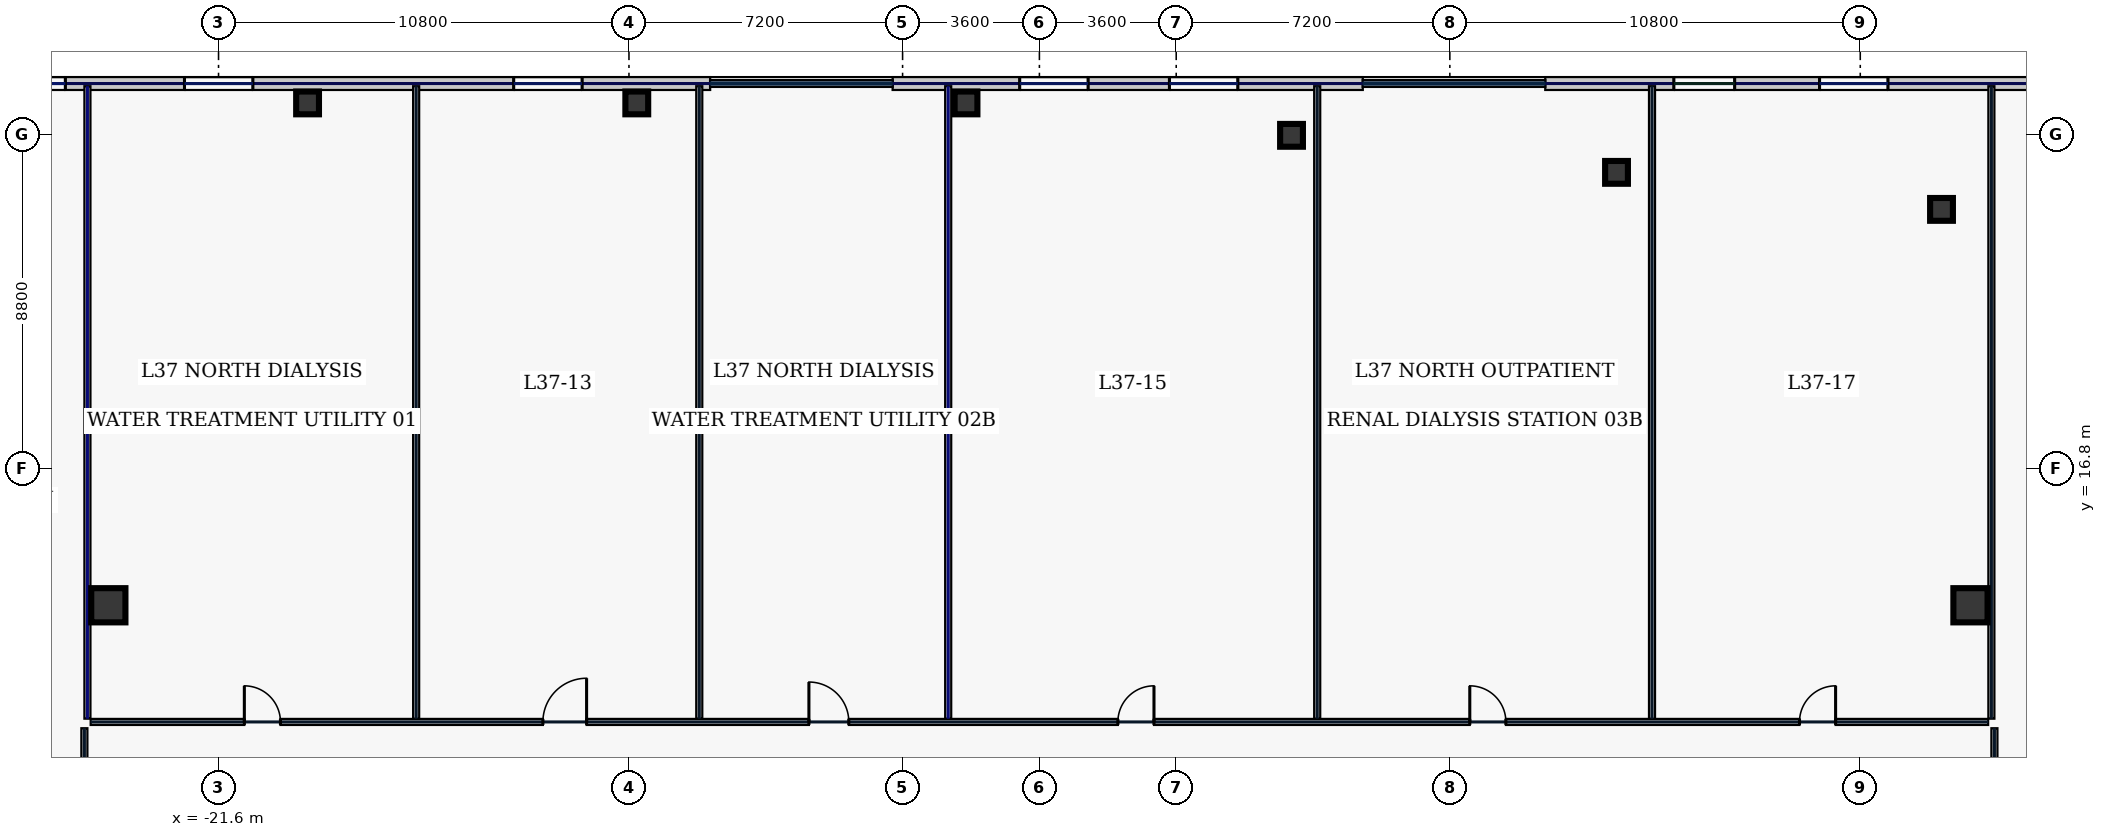
"""IFC4 building model, lengths in metres.
Left out: names, types, materials, properties, quantities, classifications, styles, units other than length and angle.
Written with IfcOpenShell. Run it as: python <this file> out.ifc"""

import sys

from ifc_helpers import new_model, si_unit, direction, frame, frame_2d, origin, origin_2d, place, context, subcontext, project, spatial, rectangle, hollow_rectangle, extrude, element, fill, save


model = new_model("IFC4")
c1 = context("Model", 3, precision=1e-05, world=origin(), true_north=direction((0.0, 1.0)))
c2 = subcontext(c1, "Body", "Model", "MODEL_VIEW")
j1 = project(units=[si_unit("LENGTHUNIT", "METRE"), si_unit("PLANEANGLEUNIT", "RADIAN")], contexts=[c1])
p1 = place(None, origin())
s1 = spatial("IfcSite", under=j1, at=p1, CompositionType="ELEMENT")
p2 = place(p1, origin())
s2 = spatial("IfcBuilding", under=s1, at=p2, CompositionType="ELEMENT")
p3 = place(p2, frame((0.0, 0.0, 164.2)))
s3 = spatial("IfcBuildingStorey", under=s2, at=p3, CompositionType="ELEMENT", Elevation=164.2)
for number, where, z_axis, x_axis in (
    (1, (-24.5, 13.2, 0.0), (0.0, 0.0, 1.0), (1.0, 0.0, 0.0)),
    (2, (24.5, 13.2, 0.0), (0.0, 0.0, 1.0), (1.0, 0.0, 0.0)),
):
    element("IfcColumn", number, at=place(p3, frame(where, z_axis=z_axis, x_axis=x_axis)), inside=s3, PredefinedType="COLUMN", context=c2, shape_type="SweptSolid", body=[
        extrude(hollow_rectangle(XDim=0.9, YDim=0.9, WallThickness=0.04, at=origin_2d()), origin(), (0.0, 0.0, 1.0), 3.74),
    ])
for number, where, z_axis, x_axis in (
    (3, (23.738, 23.618, 0.0), (0.0, 0.0, 1.0), (1.0, 0.0, 0.0)),
    (4, (15.186, 24.592, 0.0), (0.0, 0.0, 1.0), (1.0, 0.0, 0.0)),
    (5, (6.634, 25.567, 0.0), (0.0, 0.0, 1.0), (1.0, 0.0, 0.0)),
    (6, (-1.931, 26.42, 0.0), (0.0, 0.0, 1.0), (1.0, 0.0, 0.0)),
    (7, (-10.594, 26.42, 0.0), (0.0, 0.0, 1.0), (1.0, 0.0, 0.0)),
    (8, (-19.257, 26.42, 0.0), (0.0, 0.0, 1.0), (1.0, 0.0, 0.0)),
):
    element("IfcColumn", number, at=place(p3, frame(where, z_axis=z_axis, x_axis=x_axis)), inside=s3, PredefinedType="COLUMN", context=c2, shape_type="SweptSolid", body=[
        extrude(hollow_rectangle(XDim=0.6, YDim=0.6, WallThickness=0.028, at=origin_2d()), origin(), (0.0, 0.0, 1.0), 3.74),
    ])
p4 = place(p3, frame((33.4, 26.93, 0.0), z_axis=(0.0, 0.0, 1.0), x_axis=(-1.0, 0.0, 0.0)))
e9 = element("IfcWall", 9, at=p4, inside=s3, PredefinedType="STANDARD", context=c2, shape_type="SweptSolid", body=[
    extrude(rectangle(XDim=20.09, YDim=0.34, at=frame_2d((10.045, 0.0))), origin(), (0.0, 0.0, 1.0), 3.74),
])
p5 = place(p4, frame((15.105, 0.0, 0.22)))
e10 = element("IfcOpeningElement", 10, at=p5, cuts=e9, PredefinedType="OPENING", context=c2, shape_type="SweptSolid", body=[
    extrude(rectangle(XDim=1.6, YDim=1.2, at=frame_2d((0.8, 0.6))), frame((0.0, 0.18, 0.0), z_axis=(0.0, -1.0, 0.0), x_axis=(1.0, 0.0, 0.0)), (0.0, 0.0, 1.0), 0.36),
])
p6 = place(p4, frame((11.071, 0.0, 0.7)))
e11 = element("IfcOpeningElement", 11, at=p6, cuts=e9, PredefinedType="OPENING", context=c2, shape_type="SweptSolid", body=[
    extrude(rectangle(XDim=1.8, YDim=2.2, at=frame_2d((0.9, 1.1))), frame((0.0, 0.18, 0.0), z_axis=(0.0, -1.0, 0.0), x_axis=(1.0, 0.0, 0.0)), (0.0, 0.0, 1.0), 0.36),
])
p7 = place(p4, frame((6.48, 0.0, 0.7)))
e12 = element("IfcOpeningElement", 12, at=p7, cuts=e9, PredefinedType="OPENING", context=c2, shape_type="SweptSolid", body=[
    extrude(rectangle(XDim=0.85, YDim=1.85, at=frame_2d((0.425, 0.925))), frame((0.0, 0.18, 0.0), z_axis=(0.0, -1.0, 0.0), x_axis=(1.0, 0.0, 0.0)), (0.0, 0.0, 1.0), 0.36),
])
p8 = place(p4, frame((2.591, 0.0, 0.7)))
e13 = element("IfcOpeningElement", 13, at=p8, cuts=e9, PredefinedType="OPENING", context=c2, shape_type="SweptSolid", body=[
    extrude(rectangle(XDim=1.8, YDim=2.2, at=frame_2d((0.9, 1.1))), frame((0.0, 0.18, 0.0), z_axis=(0.0, -1.0, 0.0), x_axis=(1.0, 0.0, 0.0)), (0.0, 0.0, 1.0), 0.36),
])
p9 = place(p3, frame((8.51, 26.93, 0.0), z_axis=(0.0, 0.0, 1.0), x_axis=(-1.0, 0.0, 0.0)))
e14 = element("IfcWall", 14, at=p9, inside=s3, PredefinedType="STANDARD", context=c2, shape_type="SweptSolid", body=[
    extrude(rectangle(XDim=12.373, YDim=0.34, at=frame_2d((6.187, 0.0))), origin(), (0.0, 0.0, 1.0), 3.74),
])
p10 = place(p9, frame((7.229, 0.0, 0.7)))
e15 = element("IfcOpeningElement", 15, at=p10, cuts=e14, PredefinedType="OPENING", context=c2, shape_type="SweptSolid", body=[
    extrude(rectangle(XDim=1.8, YDim=2.2, at=frame_2d((0.9, 1.1))), frame((0.0, 0.18, 0.0), z_axis=(0.0, -1.0, 0.0), x_axis=(1.0, 0.0, 0.0)), (0.0, 0.0, 1.0), 0.36),
])
p11 = place(p9, frame((3.289, 0.0, 0.7)))
e16 = element("IfcOpeningElement", 16, at=p11, cuts=e14, PredefinedType="OPENING", context=c2, shape_type="SweptSolid", body=[
    extrude(rectangle(XDim=1.8, YDim=2.2, at=frame_2d((0.9, 1.1))), frame((0.0, 0.18, 0.0), z_axis=(0.0, -1.0, 0.0), x_axis=(1.0, 0.0, 0.0)), (0.0, 0.0, 1.0), 0.36),
])
p12 = place(p3, frame((-8.663, 26.93, 0.0), z_axis=(0.0, 0.0, 1.0), x_axis=(-1.0, 0.0, 0.0)))
e17 = element("IfcWall", 17, at=p12, inside=s3, PredefinedType="STANDARD", context=c2, shape_type="SweptSolid", body=[
    extrude(rectangle(XDim=19.937, YDim=0.34, at=frame_2d((9.969, 0.0))), origin(), (0.0, 0.0, 1.0), 3.74),
])
p13 = place(p12, frame((16.968, 0.0, 0.7)))
e18 = element("IfcOpeningElement", 18, at=p13, cuts=e17, PredefinedType="OPENING", context=c2, shape_type="SweptSolid", body=[
    extrude(rectangle(XDim=0.85, YDim=1.85, at=frame_2d((0.425, 0.925))), frame((0.0, 0.18, 0.0), z_axis=(0.0, -1.0, 0.0), x_axis=(1.0, 0.0, 0.0)), (0.0, 0.0, 1.0), 0.36),
])
p14 = place(p12, frame((12.033, 0.0, 0.7)))
e19 = element("IfcOpeningElement", 19, at=p14, cuts=e17, PredefinedType="OPENING", context=c2, shape_type="SweptSolid", body=[
    extrude(rectangle(XDim=1.8, YDim=2.2, at=frame_2d((0.9, 1.1))), frame((0.0, 0.18, 0.0), z_axis=(0.0, -1.0, 0.0), x_axis=(1.0, 0.0, 0.0)), (0.0, 0.0, 1.0), 0.36),
])
p15 = place(p12, frame((3.371, 0.0, 0.7)))
e20 = element("IfcOpeningElement", 20, at=p15, cuts=e17, PredefinedType="OPENING", context=c2, shape_type="SweptSolid", body=[
    extrude(rectangle(XDim=1.8, YDim=2.2, at=frame_2d((0.9, 1.1))), frame((0.0, 0.18, 0.0), z_axis=(0.0, -1.0, 0.0), x_axis=(1.0, 0.0, 0.0)), (0.0, 0.0, 1.0), 0.36),
])
p16 = place(p3, frame((-25.13, 6.985, 0.0), z_axis=(0.0, 0.0, 1.0), x_axis=(0.0, 1.0, 0.0)))
e21 = element("IfcWall", 21, at=p16, inside=s3, PredefinedType="PARTITIONING", context=c2, shape_type="SweptSolid", body=[
    extrude(rectangle(XDim=2.98, YDim=0.16, at=frame_2d((1.49, 0.0))), origin(), (0.0, 0.0, 1.0), 3.74),
])
p17 = place(p16, frame((1.1, 0.0, 0.0)))
e22 = element("IfcOpeningElement", 22, at=p17, cuts=e21, PredefinedType="OPENING", context=c2, shape_type="SweptSolid", body=[
    extrude(rectangle(XDim=0.95, YDim=2.2, at=frame_2d((0.475, 1.1))), frame((0.0, 0.09, 0.0), z_axis=(0.0, -1.0, 0.0), x_axis=(1.0, 0.0, 0.0)), (0.0, 0.0, 1.0), 0.18),
])
p18 = place(p3, frame((-24.965, 10.13, 0.0), z_axis=(0.0, 0.0, 1.0), x_axis=(1.0, 0.0, 0.0)))
e23 = element("IfcWall", 23, at=p18, inside=s3, PredefinedType="PARTITIONING", context=c2, shape_type="SweptSolid", body=[
    extrude(rectangle(XDim=49.93, YDim=0.16, at=frame_2d((24.965, 0.0))), origin(), (0.0, 0.0, 1.0), 3.74),
])
p19 = place(p18, frame((4.044, 0.0, 0.0)))
e24 = element("IfcOpeningElement", 24, at=p19, cuts=e23, PredefinedType="OPENING", context=c2, shape_type="SweptSolid", body=[
    extrude(rectangle(XDim=0.95, YDim=2.2, at=frame_2d((0.475, 1.1))), frame((0.0, 0.09, 0.0), z_axis=(0.0, -1.0, 0.0), x_axis=(1.0, 0.0, 0.0)), (0.0, 0.0, 1.0), 0.18),
])
p20 = place(p18, frame((11.9, 0.0, 0.0)))
e25 = element("IfcOpeningElement", 25, at=p20, cuts=e23, PredefinedType="OPENING", context=c2, shape_type="SweptSolid", body=[
    extrude(rectangle(XDim=1.15, YDim=2.2, at=frame_2d((0.575, 1.1))), frame((0.0, 0.09, 0.0), z_axis=(0.0, -1.0, 0.0), x_axis=(1.0, 0.0, 0.0)), (0.0, 0.0, 1.0), 0.18),
])
p21 = place(p18, frame((18.9, 0.0, 0.0)))
e26 = element("IfcOpeningElement", 26, at=p21, cuts=e23, PredefinedType="OPENING", context=c2, shape_type="SweptSolid", body=[
    extrude(rectangle(XDim=1.05, YDim=2.2, at=frame_2d((0.525, 1.1))), frame((0.0, 0.09, 0.0), z_axis=(0.0, -1.0, 0.0), x_axis=(1.0, 0.0, 0.0)), (0.0, 0.0, 1.0), 0.18),
])
p22 = place(p18, frame((27.03, 0.0, 0.0)))
e27 = element("IfcOpeningElement", 27, at=p22, cuts=e23, PredefinedType="OPENING", context=c2, shape_type="SweptSolid", body=[
    extrude(rectangle(XDim=0.95, YDim=2.2, at=frame_2d((0.475, 1.1))), frame((0.0, 0.09, 0.0), z_axis=(0.0, -1.0, 0.0), x_axis=(1.0, 0.0, 0.0)), (0.0, 0.0, 1.0), 0.18),
])
p23 = place(p18, frame((36.29, 0.0, 0.0)))
e28 = element("IfcOpeningElement", 28, at=p23, cuts=e23, PredefinedType="OPENING", context=c2, shape_type="SweptSolid", body=[
    extrude(rectangle(XDim=0.95, YDim=2.2, at=frame_2d((0.475, 1.1))), frame((0.0, 0.09, 0.0), z_axis=(0.0, -1.0, 0.0), x_axis=(1.0, 0.0, 0.0)), (0.0, 0.0, 1.0), 0.18),
])
p24 = place(p18, frame((44.966, 0.0, 0.0)))
e29 = element("IfcOpeningElement", 29, at=p24, cuts=e23, PredefinedType="OPENING", context=c2, shape_type="SweptSolid", body=[
    extrude(rectangle(XDim=0.95, YDim=2.2, at=frame_2d((0.475, 1.1))), frame((0.0, 0.09, 0.0), z_axis=(0.0, -1.0, 0.0), x_axis=(1.0, 0.0, 0.0)), (0.0, 0.0, 1.0), 0.18),
])
p25 = place(p3, frame((25.13, 9.965, 0.0), z_axis=(0.0, 0.0, 1.0), x_axis=(0.0, -1.0, 0.0)))
e30 = element("IfcWall", 30, at=p25, inside=s3, PredefinedType="PARTITIONING", context=c2, shape_type="SweptSolid", body=[
    extrude(rectangle(XDim=2.98, YDim=0.16, at=frame_2d((1.49, 0.0))), origin(), (0.0, 0.0, 1.0), 3.74),
])
p26 = place(p25, frame((1.1, 0.0, 0.0)))
e31 = element("IfcOpeningElement", 31, at=p26, cuts=e30, PredefinedType="OPENING", context=c2, shape_type="SweptSolid", body=[
    extrude(rectangle(XDim=0.95, YDim=2.2, at=frame_2d((0.475, 1.1))), frame((0.0, 0.09, 0.0), z_axis=(0.0, -1.0, 0.0), x_axis=(1.0, 0.0, 0.0)), (0.0, 0.0, 1.0), 0.18),
])
p27 = place(p3, frame((-25.05, 10.215, 0.0), z_axis=(0.0, 0.0, 1.0), x_axis=(0.0, 1.0, 0.0)))
e32 = element("IfcWall", 32, at=p27, inside=s3, PredefinedType="PARTITIONING", context=c2, shape_type="SweptSolid", body=[
    extrude(rectangle(XDim=16.645, YDim=0.16, at=frame_2d((8.323, 0.0))), origin(), (0.0, 0.0, 1.0), 3.285),
])
for number, where, z_axis, x_axis in (
    (33, (25.05, 10.215, 0.0), (0.0, 0.0, 1.0), (0.0, 1.0, 0.0)),
    (34, (-16.4, 10.215, 0.0), (0.0, 0.0, 1.0), (0.0, 1.0, 0.0)),
):
    element("IfcWall", number, at=place(p3, frame(where, z_axis=z_axis, x_axis=x_axis)), inside=s3, PredefinedType="PARTITIONING", context=c2, shape_type="SweptSolid", body=[
        extrude(rectangle(XDim=16.645, YDim=0.16, at=frame_2d((8.323, 0.0))), origin(), (0.0, 0.0, 1.0), 3.74),
    ])
p28 = place(p3, frame((-2.4, 10.215, 0.0), z_axis=(0.0, 0.0, 1.0), x_axis=(0.0, 1.0, 0.0)))
e35 = element("IfcWall", 35, at=p28, inside=s3, PredefinedType="PARTITIONING", context=c2, shape_type="SweptSolid", body=[
    extrude(rectangle(XDim=16.645, YDim=0.16, at=frame_2d((8.323, 0.0))), origin(), (0.0, 0.0, 1.0), 3.285),
])
for number, where, z_axis, x_axis in (
    (36, (16.12, 10.215, 0.0), (0.0, 0.0, 1.0), (0.0, 1.0, 0.0)),
    (37, (-8.95, 10.215, 0.0), (0.0, 0.0, 1.0), (0.0, 1.0, 0.0)),
    (38, (7.31, 10.215, 0.0), (0.0, 0.0, 1.0), (0.0, 1.0, 0.0)),
):
    element("IfcWall", number, at=place(p3, frame(where, z_axis=z_axis, x_axis=x_axis)), inside=s3, PredefinedType="PARTITIONING", context=c2, shape_type="SweptSolid", body=[
        extrude(rectangle(XDim=16.645, YDim=0.16, at=frame_2d((8.323, 0.0))), origin(), (0.0, 0.0, 1.0), 3.74),
    ])
p29 = place(p5, origin())
e39 = element("IfcWindow", 39, at=p29, inside=s3, PartitioningType="SINGLE_PANEL", PredefinedType="WINDOW", context=c2, shape_type="SweptSolid", body=[
    extrude(rectangle(XDim=1.6, YDim=1.2, at=frame_2d((0.8, 0.6))), frame((0.0, 0.03, 0.0), z_axis=(0.0, -1.0, 0.0), x_axis=(1.0, 0.0, 0.0)), (0.0, 0.0, 1.0), 0.06),
])
fill(e10, e39)
p30 = place(p6, origin())
e40 = element("IfcWindow", 40, at=p30, inside=s3, PartitioningType="SINGLE_PANEL", PredefinedType="WINDOW", context=c2, shape_type="SweptSolid", body=[
    extrude(rectangle(XDim=1.8, YDim=2.2, at=frame_2d((0.9, 1.1))), frame((0.0, 0.03, 0.0), z_axis=(0.0, -1.0, 0.0), x_axis=(1.0, 0.0, 0.0)), (0.0, 0.0, 1.0), 0.06),
])
fill(e11, e40)
p31 = place(p10, origin())
e41 = element("IfcWindow", 41, at=p31, inside=s3, PartitioningType="SINGLE_PANEL", PredefinedType="WINDOW", context=c2, shape_type="SweptSolid", body=[
    extrude(rectangle(XDim=1.8, YDim=2.2, at=frame_2d((0.9, 1.1))), frame((0.0, 0.03, 0.0), z_axis=(0.0, -1.0, 0.0), x_axis=(1.0, 0.0, 0.0)), (0.0, 0.0, 1.0), 0.06),
])
fill(e15, e41)
p32 = place(p11, origin())
e42 = element("IfcWindow", 42, at=p32, inside=s3, PartitioningType="SINGLE_PANEL", PredefinedType="WINDOW", context=c2, shape_type="SweptSolid", body=[
    extrude(rectangle(XDim=1.8, YDim=2.2, at=frame_2d((0.9, 1.1))), frame((0.0, 0.03, 0.0), z_axis=(0.0, -1.0, 0.0), x_axis=(1.0, 0.0, 0.0)), (0.0, 0.0, 1.0), 0.06),
])
fill(e16, e42)
p33 = place(p13, origin())
e43 = element("IfcWindow", 43, at=p33, inside=s3, PartitioningType="SINGLE_PANEL", PredefinedType="WINDOW", context=c2, shape_type="SweptSolid", body=[
    extrude(rectangle(XDim=0.85, YDim=1.85, at=frame_2d((0.425, 0.925))), frame((0.0, 0.03, 0.0), z_axis=(0.0, -1.0, 0.0), x_axis=(1.0, 0.0, 0.0)), (0.0, 0.0, 1.0), 0.06),
])
fill(e18, e43)
p34 = place(p14, origin())
e44 = element("IfcWindow", 44, at=p34, inside=s3, PartitioningType="SINGLE_PANEL", PredefinedType="WINDOW", context=c2, shape_type="SweptSolid", body=[
    extrude(rectangle(XDim=1.8, YDim=2.2, at=frame_2d((0.9, 1.1))), frame((0.0, 0.03, 0.0), z_axis=(0.0, -1.0, 0.0), x_axis=(1.0, 0.0, 0.0)), (0.0, 0.0, 1.0), 0.06),
])
fill(e19, e44)
p35 = place(p15, origin())
e45 = element("IfcWindow", 45, at=p35, inside=s3, PartitioningType="SINGLE_PANEL", PredefinedType="WINDOW", context=c2, shape_type="SweptSolid", body=[
    extrude(rectangle(XDim=1.8, YDim=2.2, at=frame_2d((0.9, 1.1))), frame((0.0, 0.03, 0.0), z_axis=(0.0, -1.0, 0.0), x_axis=(1.0, 0.0, 0.0)), (0.0, 0.0, 1.0), 0.06),
])
fill(e20, e45)
p36 = place(p19, origin())
e46 = element("IfcDoor", 46, at=p36, inside=s3, OperationType="SINGLE_SWING_LEFT", PredefinedType="DOOR", context=c2, shape_type="SweptSolid", body=[
    extrude(rectangle(XDim=0.95, YDim=2.2, at=frame_2d((0.475, 1.1))), frame((0.0, 0.025, 0.0), z_axis=(0.0, -1.0, 0.0), x_axis=(1.0, 0.0, 0.0)), (0.0, 0.0, 1.0), 0.05),
])
fill(e24, e46)
p37 = place(p20, origin())
e47 = element("IfcDoor", 47, at=p37, inside=s3, OperationType="SINGLE_SWING_RIGHT", PredefinedType="DOOR", context=c2, shape_type="SweptSolid", body=[
    extrude(rectangle(XDim=1.15, YDim=2.2, at=frame_2d((0.575, 1.1))), frame((0.0, 0.025, 0.0), z_axis=(0.0, -1.0, 0.0), x_axis=(1.0, 0.0, 0.0)), (0.0, 0.0, 1.0), 0.05),
])
fill(e25, e47)
p38 = place(p21, origin())
e48 = element("IfcDoor", 48, at=p38, inside=s3, OperationType="SINGLE_SWING_LEFT", PredefinedType="DOOR", context=c2, shape_type="SweptSolid", body=[
    extrude(rectangle(XDim=1.05, YDim=2.2, at=frame_2d((0.525, 1.1))), frame((0.0, 0.025, 0.0), z_axis=(0.0, -1.0, 0.0), x_axis=(1.0, 0.0, 0.0)), (0.0, 0.0, 1.0), 0.05),
])
fill(e26, e48)
p39 = place(p22, origin())
e49 = element("IfcDoor", 49, at=p39, inside=s3, OperationType="SINGLE_SWING_RIGHT", PredefinedType="DOOR", context=c2, shape_type="SweptSolid", body=[
    extrude(rectangle(XDim=0.95, YDim=2.2, at=frame_2d((0.475, 1.1))), frame((0.0, 0.025, 0.0), z_axis=(0.0, -1.0, 0.0), x_axis=(1.0, 0.0, 0.0)), (0.0, 0.0, 1.0), 0.05),
])
fill(e27, e49)
p40 = place(p23, origin())
e50 = element("IfcDoor", 50, at=p40, inside=s3, OperationType="SINGLE_SWING_LEFT", PredefinedType="DOOR", context=c2, shape_type="SweptSolid", body=[
    extrude(rectangle(XDim=0.95, YDim=2.2, at=frame_2d((0.475, 1.1))), frame((0.0, 0.025, 0.0), z_axis=(0.0, -1.0, 0.0), x_axis=(1.0, 0.0, 0.0)), (0.0, 0.0, 1.0), 0.05),
])
fill(e28, e50)
p41 = place(p24, origin())
e51 = element("IfcDoor", 51, at=p41, inside=s3, OperationType="SINGLE_SWING_RIGHT", PredefinedType="DOOR", context=c2, shape_type="SweptSolid", body=[
    extrude(rectangle(XDim=0.95, YDim=2.2, at=frame_2d((0.475, 1.1))), frame((0.0, 0.025, 0.0), z_axis=(0.0, -1.0, 0.0), x_axis=(1.0, 0.0, 0.0)), (0.0, 0.0, 1.0), 0.05),
])
fill(e29, e51)
save(model, sys.argv[1])
